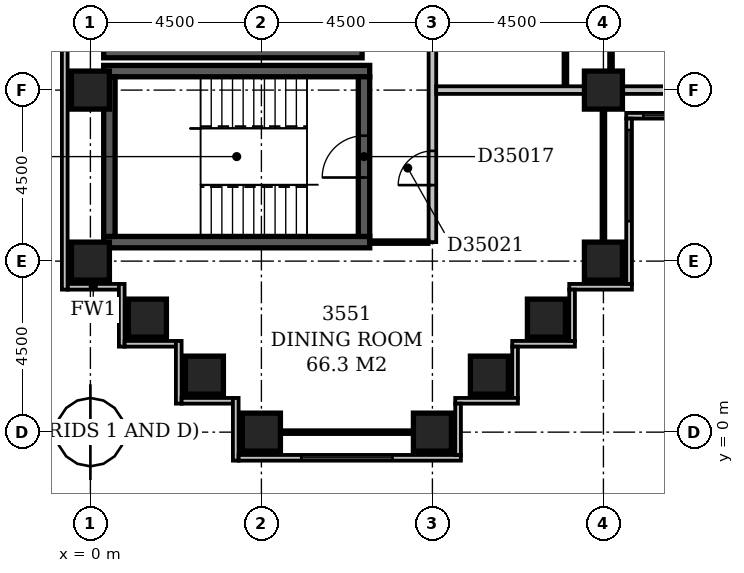
"""IFC4 building model, lengths in metres.
Left out: names, types, materials, properties, quantities, classifications, styles, units other than length and angle.
Written with IfcOpenShell. Run it as: python <this file> out.ifc"""

import sys

from ifc_helpers import new_model, si_unit, direction, frame, frame_2d, origin, origin_2d, place, context, subcontext, project, spatial, rectangle, extrude, element, fill, save


model = new_model("IFC4")
c1 = context("Model", 3, precision=1e-05, world=origin(), true_north=direction((0.0, 1.0)))
c2 = subcontext(c1, "Body", "Model", "MODEL_VIEW")
j1 = project(units=[si_unit("LENGTHUNIT", "METRE"), si_unit("PLANEANGLEUNIT", "RADIAN")], contexts=[c1])
p1 = place(None, origin())
s1 = spatial("IfcSite", under=j1, at=p1, CompositionType="ELEMENT")
p2 = place(p1, origin())
s2 = spatial("IfcBuilding", under=s1, at=p2, CompositionType="ELEMENT")
p3 = place(p2, frame((0.0, 0.0, 141.2)))
s3 = spatial("IfcBuildingStorey", under=s2, at=p3, CompositionType="ELEMENT", Elevation=141.2)
for number, where, z_axis, x_axis in (
    (1, (0.35, 5.0, -0.3), (0.0, 0.0, 1.0), (1.0, 0.0, 0.0)),
    (2, (0.35, 9.5, -0.3), (0.0, 0.0, 1.0), (1.0, 0.0, 0.0)),
):
    element("IfcWall", number, at=place(p3, frame(where, z_axis=z_axis, x_axis=x_axis)), inside=s3, PredefinedType="SHEAR", context=c2, shape_type="SweptSolid", body=[
        extrude(rectangle(XDim=7.0, YDim=0.3, at=frame_2d((3.5, 0.0))), origin(), (0.0, 0.0, 1.0), 3.6),
    ])
p4 = place(p3, frame((0.35, 10.0, -0.3), z_axis=(0.0, 0.0, 1.0), x_axis=(1.0, 0.0, 0.0)))
e3 = element("IfcWall", 3, at=p4, inside=s3, PredefinedType="SHEAR", context=c2, shape_type="SweptSolid", body=[
    extrude(rectangle(XDim=6.8, YDim=0.3, at=frame_2d((3.4, 0.0))), origin(), (0.0, 0.0, 1.0), 3.6),
])
p5 = place(p3, frame((0.5, 5.15, -0.3), z_axis=(0.0, 0.0, 1.0), x_axis=(0.0, 1.0, 0.0)))
e4 = element("IfcWall", 4, at=p5, inside=s3, PredefinedType="SHEAR", context=c2, shape_type="SweptSolid", body=[
    extrude(rectangle(XDim=4.2, YDim=0.3, at=frame_2d((2.1, 0.0))), origin(), (0.0, 0.0, 1.0), 3.6),
])
p6 = place(p3, frame((7.2, 5.15, -0.3), z_axis=(0.0, 0.0, 1.0), x_axis=(0.0, 1.0, 0.0)))
e5 = element("IfcWall", 5, at=p6, inside=s3, PredefinedType="SHEAR", context=c2, shape_type="SweptSolid", body=[
    extrude(rectangle(XDim=4.2, YDim=0.3, at=frame_2d((2.1, 0.0))), origin(), (0.0, 0.0, 1.0), 3.6),
])
p7 = place(p6, frame((1.55, 0.0, 0.3)))
e6 = element("IfcOpeningElement", 6, at=p7, cuts=e5, PredefinedType="OPENING", context=c2, shape_type="SweptSolid", body=[
    extrude(rectangle(XDim=1.1, YDim=2.1, at=frame_2d((0.55, 1.05))), frame((0.0, 0.162, 0.0), z_axis=(0.0, -1.0, 0.0), x_axis=(1.0, 0.0, 0.0)), (0.0, 0.0, 1.0), 0.324),
])
for number, where, z_axis, x_axis in (
    (7, (4.5, 0.0, -0.3), (0.0, 0.0, 1.0), (1.0, 0.0, 0.0)),
    (8, (9.0, 0.0, -0.3), (0.0, 0.0, 1.0), (1.0, 0.0, 0.0)),
    (9, (3.0, 1.5, -0.3), (0.0, 0.0, 1.0), (1.0, 0.0, 0.0)),
    (10, (10.5, 1.5, -0.3), (0.0, 0.0, 1.0), (1.0, 0.0, 0.0)),
    (11, (1.5, 3.0, -0.3), (0.0, 0.0, 1.0), (1.0, 0.0, 0.0)),
    (12, (12.0, 3.0, -0.3), (0.0, 0.0, 1.0), (1.0, 0.0, 0.0)),
    (13, (0.0, 4.5, -0.3), (0.0, 0.0, 1.0), (1.0, 0.0, 0.0)),
    (14, (13.5, 4.5, -0.3), (0.0, 0.0, 1.0), (1.0, 0.0, 0.0)),
    (15, (0.0, 9.0, -0.3), (0.0, 0.0, 1.0), (1.0, 0.0, 0.0)),
    (16, (13.5, 9.0, -0.3), (0.0, 0.0, 1.0), (1.0, 0.0, 0.0)),
):
    element("IfcColumn", number, at=place(p3, frame(where, z_axis=z_axis, x_axis=x_axis)), inside=s3, PredefinedType="COLUMN", context=c2, shape_type="SweptSolid", body=[
        extrude(rectangle(XDim=1.0, YDim=1.0, at=origin_2d()), origin(), (0.0, 0.0, 1.0), 3.6),
    ])
p8 = place(p3, frame((9.675, -0.6, 0.0), z_axis=(0.0, 0.0, 1.0), x_axis=(0.0, 1.0, 0.0)))
e17 = element("IfcWall", 17, at=p8, inside=s3, PredefinedType="STANDARD", context=c2, shape_type="SweptSolid", body=[
    extrude(rectangle(XDim=1.35, YDim=0.15, at=frame_2d((0.675, 0.0))), origin(), (0.0, 0.0, 1.0), 2.7),
])
p9 = place(p3, frame((9.6, 0.825, 0.0), z_axis=(0.0, 0.0, 1.0), x_axis=(1.0, 0.0, 0.0)))
e18 = element("IfcWall", 18, at=p9, inside=s3, PredefinedType="STANDARD", context=c2, shape_type="SweptSolid", body=[
    extrude(rectangle(XDim=1.65, YDim=0.15, at=frame_2d((0.825, 0.0))), origin(), (0.0, 0.0, 1.0), 2.7),
])
p10 = place(p3, frame((11.175, 0.9, 0.0), z_axis=(0.0, 0.0, 1.0), x_axis=(0.0, 1.0, 0.0)))
e19 = element("IfcWall", 19, at=p10, inside=s3, PredefinedType="STANDARD", context=c2, shape_type="SweptSolid", body=[
    extrude(rectangle(XDim=1.35, YDim=0.15, at=frame_2d((0.675, 0.0))), origin(), (0.0, 0.0, 1.0), 2.7),
])
p11 = place(p3, frame((11.1, 2.325, 0.0), z_axis=(0.0, 0.0, 1.0), x_axis=(1.0, 0.0, 0.0)))
e20 = element("IfcWall", 20, at=p11, inside=s3, PredefinedType="STANDARD", context=c2, shape_type="SweptSolid", body=[
    extrude(rectangle(XDim=1.65, YDim=0.15, at=frame_2d((0.825, 0.0))), origin(), (0.0, 0.0, 1.0), 2.7),
])
p12 = place(p3, frame((12.675, 2.4, 0.0), z_axis=(0.0, 0.0, 1.0), x_axis=(0.0, 1.0, 0.0)))
e21 = element("IfcWall", 21, at=p12, inside=s3, PredefinedType="STANDARD", context=c2, shape_type="SweptSolid", body=[
    extrude(rectangle(XDim=1.35, YDim=0.15, at=frame_2d((0.675, 0.0))), origin(), (0.0, 0.0, 1.0), 2.7),
])
p13 = place(p3, frame((12.6, 3.825, 0.0), z_axis=(0.0, 0.0, 1.0), x_axis=(1.0, 0.0, 0.0)))
e22 = element("IfcWall", 22, at=p13, inside=s3, PredefinedType="STANDARD", context=c2, shape_type="SweptSolid", body=[
    extrude(rectangle(XDim=1.65, YDim=0.15, at=frame_2d((0.825, 0.0))), origin(), (0.0, 0.0, 1.0), 2.7),
])
p14 = place(p3, frame((14.175, 3.9, 0.0), z_axis=(0.0, 0.0, 1.0), x_axis=(0.0, 1.0, 0.0)))
e23 = element("IfcWall", 23, at=p14, inside=s3, PredefinedType="STANDARD", context=c2, shape_type="SweptSolid", body=[
    extrude(rectangle(XDim=4.35, YDim=0.15, at=frame_2d((2.175, 0.0))), origin(), (0.0, 0.0, 1.0), 2.7),
])
p15 = place(p14, frame((1.65, 0.0, 0.6)))
e24 = element("IfcOpeningElement", 24, at=p15, cuts=e23, PredefinedType="OPENING", context=c2, shape_type="SweptSolid", body=[
    extrude(rectangle(XDim=2.4, YDim=1.8, at=frame_2d((1.2, 0.9))), frame((0.0, 0.087, 0.0), z_axis=(0.0, -1.0, 0.0), x_axis=(1.0, 0.0, 0.0)), (0.0, 0.0, 1.0), 0.174),
])
p16 = place(p3, frame((14.1, 8.325, 0.0), z_axis=(0.0, 0.0, 1.0), x_axis=(1.0, 0.0, 0.0)))
e25 = element("IfcWall", 25, at=p16, inside=s3, PredefinedType="STANDARD", context=c2, shape_type="SweptSolid", body=[
    extrude(rectangle(XDim=4.65, YDim=0.15, at=frame_2d((2.325, 0.0))), origin(), (0.0, 0.0, 1.0), 2.7),
])
p17 = place(p16, frame((0.45, 0.0, 0.6)))
e26 = element("IfcOpeningElement", 26, at=p17, cuts=e25, PredefinedType="OPENING", context=c2, shape_type="SweptSolid", body=[
    extrude(rectangle(XDim=2.4, YDim=1.8, at=frame_2d((1.2, 0.9))), frame((0.0, 0.087, 0.0), z_axis=(0.0, -1.0, 0.0), x_axis=(1.0, 0.0, 0.0)), (0.0, 0.0, 1.0), 0.174),
])
p18 = place(p3, frame((-0.675, 59.1, 0.0), z_axis=(0.0, 0.0, 1.0), x_axis=(0.0, -1.0, 0.0)))
e27 = element("IfcWall", 27, at=p18, inside=s3, PredefinedType="STANDARD", context=c2, shape_type="SweptSolid", body=[
    extrude(rectangle(XDim=55.35, YDim=0.15, at=frame_2d((27.675, 0.0))), origin(), (0.0, 0.0, 1.0), 2.7),
])
p19 = place(p3, frame((-0.6, 3.825, 0.0), z_axis=(0.0, 0.0, 1.0), x_axis=(1.0, 0.0, 0.0)))
e28 = element("IfcWall", 28, at=p19, inside=s3, PredefinedType="STANDARD", context=c2, shape_type="SweptSolid", body=[
    extrude(rectangle(XDim=1.35, YDim=0.15, at=frame_2d((0.675, 0.0))), origin(), (0.0, 0.0, 1.0), 2.7),
])
p20 = place(p3, frame((0.825, 3.9, 0.0), z_axis=(0.0, 0.0, 1.0), x_axis=(0.0, -1.0, 0.0)))
e29 = element("IfcWall", 29, at=p20, inside=s3, PredefinedType="STANDARD", context=c2, shape_type="SweptSolid", body=[
    extrude(rectangle(XDim=1.65, YDim=0.15, at=frame_2d((0.825, 0.0))), origin(), (0.0, 0.0, 1.0), 2.7),
])
p21 = place(p3, frame((0.9, 2.325, 0.0), z_axis=(0.0, 0.0, 1.0), x_axis=(1.0, 0.0, 0.0)))
e30 = element("IfcWall", 30, at=p21, inside=s3, PredefinedType="STANDARD", context=c2, shape_type="SweptSolid", body=[
    extrude(rectangle(XDim=1.35, YDim=0.15, at=frame_2d((0.675, 0.0))), origin(), (0.0, 0.0, 1.0), 2.7),
])
p22 = place(p3, frame((2.325, 2.4, 0.0), z_axis=(0.0, 0.0, 1.0), x_axis=(0.0, -1.0, 0.0)))
e31 = element("IfcWall", 31, at=p22, inside=s3, PredefinedType="STANDARD", context=c2, shape_type="SweptSolid", body=[
    extrude(rectangle(XDim=1.65, YDim=0.15, at=frame_2d((0.825, 0.0))), origin(), (0.0, 0.0, 1.0), 2.7),
])
p23 = place(p3, frame((2.4, 0.825, 0.0), z_axis=(0.0, 0.0, 1.0), x_axis=(1.0, 0.0, 0.0)))
e32 = element("IfcWall", 32, at=p23, inside=s3, PredefinedType="STANDARD", context=c2, shape_type="SweptSolid", body=[
    extrude(rectangle(XDim=1.35, YDim=0.15, at=frame_2d((0.675, 0.0))), origin(), (0.0, 0.0, 1.0), 2.7),
])
p24 = place(p3, frame((3.825, 0.9, 0.0), z_axis=(0.0, 0.0, 1.0), x_axis=(0.0, -1.0, 0.0)))
e33 = element("IfcWall", 33, at=p24, inside=s3, PredefinedType="STANDARD", context=c2, shape_type="SweptSolid", body=[
    extrude(rectangle(XDim=1.65, YDim=0.15, at=frame_2d((0.825, 0.0))), origin(), (0.0, 0.0, 1.0), 2.7),
])
p25 = place(p3, frame((3.9, -0.675, 0.0), z_axis=(0.0, 0.0, 1.0), x_axis=(1.0, 0.0, 0.0)))
e34 = element("IfcWall", 34, at=p25, inside=s3, PredefinedType="STANDARD", context=c2, shape_type="SweptSolid", body=[
    extrude(rectangle(XDim=5.85, YDim=0.15, at=frame_2d((2.925, 0.0))), origin(), (0.0, 0.0, 1.0), 2.7),
])
p26 = place(p25, frame((1.65, 0.0, 0.6)))
e35 = element("IfcOpeningElement", 35, at=p26, cuts=e34, PredefinedType="OPENING", context=c2, shape_type="SweptSolid", body=[
    extrude(rectangle(XDim=2.4, YDim=1.8, at=frame_2d((1.2, 0.9))), frame((0.0, 0.087, 0.0), z_axis=(0.0, -1.0, 0.0), x_axis=(1.0, 0.0, 0.0)), (0.0, 0.0, 1.0), 0.174),
])
p27 = place(p3, frame((5.0, 0.0, 0.0), z_axis=(0.0, 0.0, 1.0), x_axis=(1.0, 0.0, 0.0)))
e36 = element("IfcWall", 36, at=p27, inside=s3, PredefinedType="PARTITIONING", context=c2, shape_type="SweptSolid", body=[
    extrude(rectangle(XDim=3.5, YDim=0.1, at=frame_2d((1.75, 0.0))), origin(), (0.0, 0.0, 1.0), 2.7),
])
p28 = place(p3, frame((0.0, 4.5, 0.0), z_axis=(0.0, 0.0, 1.0), x_axis=(0.0, 1.0, 0.0)))
e37 = element("IfcWall", 37, at=p28, inside=s3, PredefinedType="PARTITIONING", context=c2, shape_type="SweptSolid", body=[
    extrude(rectangle(XDim=0.5, YDim=0.1, at=frame_2d((0.25, 0.0))), origin(), (0.0, 0.0, 1.0), 2.7),
])
p29 = place(p3, frame((7.349, 5.0, 0.0), z_axis=(0.0, 0.0, 1.0), x_axis=(1.0, 0.0, 0.0)))
e38 = element("IfcWall", 38, at=p29, inside=s3, PredefinedType="PARTITIONING", context=c2, shape_type="SweptSolid", body=[
    extrude(rectangle(XDim=1.551, YDim=0.1, at=frame_2d((0.775, 0.0))), origin(), (0.0, 0.0, 1.0), 3.3),
])
p30 = place(p3, frame((9.0, 5.0, 0.0), z_axis=(0.0, 0.0, 1.0), x_axis=(0.0, 1.0, 0.0)))
e39 = element("IfcWall", 39, at=p30, inside=s3, PredefinedType="PARTITIONING", context=c2, shape_type="SweptSolid", body=[
    extrude(rectangle(XDim=27.75, YDim=0.2, at=frame_2d((13.875, 0.0))), origin(), (0.0, 0.0, 1.0), 3.3),
])
p31 = place(p30, frame((17.8, 0.0, 0.0)))
e40 = element("IfcOpeningElement", 40, at=p31, cuts=e39, PredefinedType="OPENING", context=c2, shape_type="SweptSolid", body=[
    extrude(rectangle(XDim=1.0, YDim=2.1, at=frame_2d((0.5, 1.05))), frame((0.0, 0.112, 0.0), z_axis=(0.0, -1.0, 0.0), x_axis=(1.0, 0.0, 0.0)), (0.0, 0.0, 1.0), 0.224),
])
p32 = place(p30, frame((14.95, 0.0, 0.0)))
e41 = element("IfcOpeningElement", 41, at=p32, cuts=e39, PredefinedType="OPENING", context=c2, shape_type="SweptSolid", body=[
    extrude(rectangle(XDim=1.0, YDim=2.1, at=frame_2d((0.5, 1.05))), frame((0.0, 0.112, 0.0), z_axis=(0.0, -1.0, 0.0), x_axis=(1.0, 0.0, 0.0)), (0.0, 0.0, 1.0), 0.224),
])
p33 = place(p30, frame((11.7, 0.0, 0.0)))
e42 = element("IfcOpeningElement", 42, at=p33, cuts=e39, PredefinedType="OPENING", context=c2, shape_type="SweptSolid", body=[
    extrude(rectangle(XDim=1.0, YDim=2.1, at=frame_2d((0.5, 1.05))), frame((0.0, 0.112, 0.0), z_axis=(0.0, -1.0, 0.0), x_axis=(1.0, 0.0, 0.0)), (0.0, 0.0, 1.0), 0.224),
])
p34 = place(p30, frame((1.5, 0.0, 0.0)))
e43 = element("IfcOpeningElement", 43, at=p34, cuts=e39, PredefinedType="OPENING", context=c2, shape_type="SweptSolid", body=[
    extrude(rectangle(XDim=0.9, YDim=2.1, at=frame_2d((0.45, 1.05))), frame((0.0, 0.112, 0.0), z_axis=(0.0, -1.0, 0.0), x_axis=(1.0, 0.0, 0.0)), (0.0, 0.0, 1.0), 0.224),
])
p35 = place(p3, frame((13.5, 5.0, 0.0), z_axis=(0.0, 0.0, 1.0), x_axis=(0.0, 1.0, 0.0)))
e44 = element("IfcWall", 44, at=p35, inside=s3, PredefinedType="PARTITIONING", context=c2, shape_type="SweptSolid", body=[
    extrude(rectangle(XDim=3.5, YDim=0.1, at=frame_2d((1.75, 0.0))), origin(), (0.0, 0.0, 1.0), 2.7),
])
p36 = place(p3, frame((9.1, 9.0, 0.0), z_axis=(0.0, 0.0, 1.0), x_axis=(1.0, 0.0, 0.0)))
e45 = element("IfcWall", 45, at=p36, inside=s3, PredefinedType="PARTITIONING", context=c2, shape_type="SweptSolid", body=[
    extrude(rectangle(XDim=3.9, YDim=0.2, at=frame_2d((1.95, 0.0))), origin(), (0.0, 0.0, 1.0), 3.3),
])
p37 = place(p3, frame((14.0, 9.0, 0.0), z_axis=(0.0, 0.0, 1.0), x_axis=(1.0, 0.0, 0.0)))
e46 = element("IfcWall", 46, at=p37, inside=s3, PredefinedType="PARTITIONING", context=c2, shape_type="SweptSolid", body=[
    extrude(rectangle(XDim=3.5, YDim=0.2, at=frame_2d((1.75, 0.0))), origin(), (0.0, 0.0, 1.0), 2.7),
])
p38 = place(p3, frame((12.5, 9.1, 0.0), z_axis=(0.0, 0.0, 1.0), x_axis=(0.0, 1.0, 0.0)))
e47 = element("IfcWall", 47, at=p38, inside=s3, PredefinedType="PARTITIONING", context=c2, shape_type="SweptSolid", body=[
    extrude(rectangle(XDim=7.3, YDim=0.1, at=frame_2d((3.65, 0.0))), origin(), (0.0, 0.0, 1.0), 3.3),
])
p39 = place(p38, frame((5.7, 0.0, 0.0)))
e48 = element("IfcOpeningElement", 48, at=p39, cuts=e47, PredefinedType="OPENING", context=c2, shape_type="SweptSolid", body=[
    extrude(rectangle(XDim=0.8, YDim=2.1, at=frame_2d((0.4, 1.05))), frame((0.0, 0.062, 0.0), z_axis=(0.0, -1.0, 0.0), x_axis=(1.0, 0.0, 0.0)), (0.0, 0.0, 1.0), 0.124),
])
p40 = place(p38, frame((1.95, 0.0, 0.0)))
e49 = element("IfcOpeningElement", 49, at=p40, cuts=e47, PredefinedType="OPENING", context=c2, shape_type="SweptSolid", body=[
    extrude(rectangle(XDim=0.9, YDim=2.1, at=frame_2d((0.45, 1.05))), frame((0.0, 0.062, 0.0), z_axis=(0.0, -1.0, 0.0), x_axis=(1.0, 0.0, 0.0)), (0.0, 0.0, 1.0), 0.124),
])
p41 = place(p3, frame((13.7, 9.5, 0.0), z_axis=(0.0, 0.0, 1.0), x_axis=(0.0, 1.0, 0.0)))
e50 = element("IfcWall", 50, at=p41, inside=s3, PredefinedType="PARTITIONING", context=c2, shape_type="SweptSolid", body=[
    extrude(rectangle(XDim=8.4, YDim=0.1, at=frame_2d((4.2, 0.0))), origin(), (0.0, 0.0, 1.0), 3.3),
])
p42 = place(p41, frame((1.3, 0.0, 0.0)))
e51 = element("IfcOpeningElement", 51, at=p42, cuts=e50, PredefinedType="OPENING", context=c2, shape_type="SweptSolid", body=[
    extrude(rectangle(XDim=0.9, YDim=2.1, at=frame_2d((0.45, 1.05))), frame((0.0, 0.062, 0.0), z_axis=(0.0, -1.0, 0.0), x_axis=(1.0, 0.0, 0.0)), (0.0, 0.0, 1.0), 0.124),
])
p43 = place(p41, frame((5.8, 0.0, 0.0)))
e52 = element("IfcOpeningElement", 52, at=p43, cuts=e50, PredefinedType="OPENING", context=c2, shape_type="SweptSolid", body=[
    extrude(rectangle(XDim=0.9, YDim=2.1, at=frame_2d((0.45, 1.05))), frame((0.0, 0.062, 0.0), z_axis=(0.0, -1.0, 0.0), x_axis=(1.0, 0.0, 0.0)), (0.0, 0.0, 1.0), 0.124),
])
p44 = place(p15, origin())
e53 = element("IfcWindow", 53, at=p44, inside=s3, PartitioningType="SINGLE_PANEL", PredefinedType="WINDOW", context=c2, shape_type="SweptSolid", body=[
    extrude(rectangle(XDim=2.4, YDim=1.8, at=frame_2d((1.2, 0.9))), frame((0.0, 0.03, 0.0), z_axis=(0.0, -1.0, 0.0), x_axis=(1.0, 0.0, 0.0)), (0.0, 0.0, 1.0), 0.06),
])
fill(e24, e53)
p45 = place(p17, origin())
e54 = element("IfcWindow", 54, at=p45, inside=s3, PartitioningType="SINGLE_PANEL", PredefinedType="WINDOW", context=c2, shape_type="SweptSolid", body=[
    extrude(rectangle(XDim=2.4, YDim=1.8, at=frame_2d((1.2, 0.9))), frame((0.0, 0.03, 0.0), z_axis=(0.0, -1.0, 0.0), x_axis=(1.0, 0.0, 0.0)), (0.0, 0.0, 1.0), 0.06),
])
fill(e26, e54)
p46 = place(p26, origin())
e55 = element("IfcWindow", 55, at=p46, inside=s3, PartitioningType="SINGLE_PANEL", PredefinedType="WINDOW", context=c2, shape_type="SweptSolid", body=[
    extrude(rectangle(XDim=2.4, YDim=1.8, at=frame_2d((1.2, 0.9))), frame((0.0, 0.03, 0.0), z_axis=(0.0, -1.0, 0.0), x_axis=(1.0, 0.0, 0.0)), (0.0, 0.0, 1.0), 0.06),
])
fill(e35, e55)
p47 = place(p7, origin())
e56 = element("IfcDoor", 56, at=p47, inside=s3, OperationType="SINGLE_SWING_LEFT", PredefinedType="DOOR", context=c2, shape_type="SweptSolid", body=[
    extrude(rectangle(XDim=1.1, YDim=2.1, at=frame_2d((0.55, 1.05))), frame((0.0, 0.025, 0.0), z_axis=(0.0, -1.0, 0.0), x_axis=(1.0, 0.0, 0.0)), (0.0, 0.0, 1.0), 0.05),
])
fill(e6, e56)
p48 = place(p34, origin())
e57 = element("IfcDoor", 57, at=p48, inside=s3, OperationType="SINGLE_SWING_LEFT", PredefinedType="DOOR", context=c2, shape_type="SweptSolid", body=[
    extrude(rectangle(XDim=0.9, YDim=2.1, at=frame_2d((0.45, 1.05))), frame((0.0, 0.025, 0.0), z_axis=(0.0, -1.0, 0.0), x_axis=(1.0, 0.0, 0.0)), (0.0, 0.0, 1.0), 0.05),
])
fill(e43, e57)
save(model, sys.argv[1])
